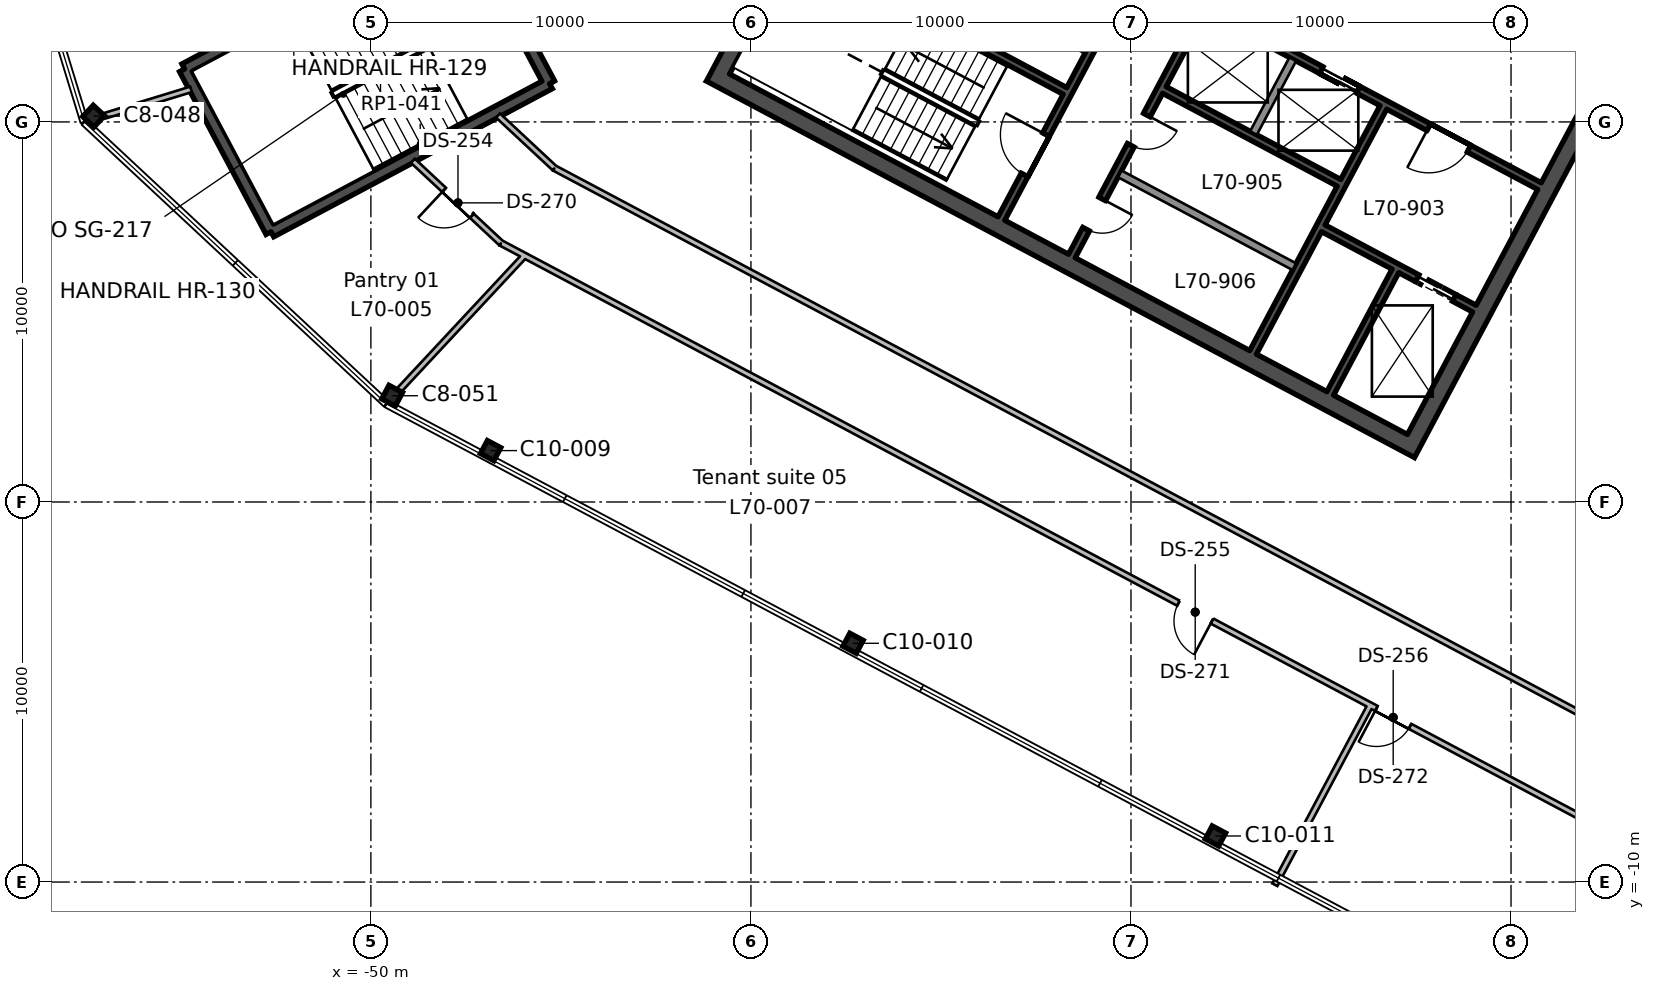
"""IFC4 building model, lengths in metres.
Left out: names, types, materials, properties, quantities, classifications, styles, units other than length and angle.
Written with IfcOpenShell. Run it as: python <this file> out.ifc"""

import sys

from ifc_helpers import new_model, si_unit, direction, frame, frame_2d, origin, origin_2d, place, context, subcontext, project, spatial, rectangle, i_section, extrude, element, fill, save


model = new_model("IFC4")
c1 = context("Model", 3, precision=1e-05, world=origin(), true_north=direction((0.0, 1.0)))
c2 = subcontext(c1, "Body", "Model", "MODEL_VIEW")
j1 = project(units=[si_unit("LENGTHUNIT", "METRE"), si_unit("PLANEANGLEUNIT", "RADIAN")], contexts=[c1])
p1 = place(None, origin())
s1 = spatial("IfcSite", under=j1, at=p1, CompositionType="ELEMENT")
p2 = place(p1, origin())
s2 = spatial("IfcBuilding", under=s1, at=p2, CompositionType="ELEMENT")
p3 = place(p2, frame((0.0, 0.0, 308.7)))
s3 = spatial("IfcBuildingStorey", under=s2, at=p3, CompositionType="ELEMENT", Elevation=308.7)
for number, where, z_axis, x_axis in (
    (1, (-27.777, -8.788, 0.0), (0.0, 0.0, 1.0), (0.883, -0.469, 0.0)),
    (2, (-37.313, -3.718, 0.0), (0.0, 0.0, 1.0), (0.883, -0.469, 0.0)),
    (3, (-46.849, 1.352, 0.0), (0.0, 0.0, 1.0), (0.883, -0.469, 0.0)),
):
    element("IfcColumn", number, at=place(p3, frame(where, z_axis=z_axis, x_axis=x_axis)), inside=s3, PredefinedType="COLUMN", context=c2, shape_type="SweptSolid", body=[
        extrude(i_section(OverallWidth=0.399, OverallDepth=0.386, WebThickness=0.021, FlangeThickness=0.033, FilletRadius=0.015, at=origin_2d()), origin(), (0.0, 0.0, 1.0), 3.9),
    ])
for number, where, z_axis, x_axis in (
    (4, (-49.441, 2.796, 0.0), (0.0, 0.0, 1.0), (0.883, -0.469, 0.0)),
    (5, (-57.296, 10.152, 0.0), (0.0, 0.0, 1.0), (0.731, -0.682, 0.0)),
):
    element("IfcColumn", number, at=place(p3, frame(where, z_axis=z_axis, x_axis=x_axis)), inside=s3, PredefinedType="COLUMN", context=c2, shape_type="SweptSolid", body=[
        extrude(i_section(OverallWidth=0.404, OverallDepth=0.406, WebThickness=0.027, FlangeThickness=0.044, FilletRadius=0.015, at=origin_2d()), origin(), (0.0, 0.0, 1.0), 3.9),
    ])
p4 = place(p3, frame((-13.771, 18.138, 0.0), z_axis=(0.0, 0.0, 1.0), x_axis=(-0.469467968382, -0.882949504028, 0.0)))
e6 = element("IfcWall", 6, at=p4, inside=s3, PredefinedType="SHEAR", context=c2, shape_type="SweptSolid", body=[
    extrude(rectangle(XDim=19.1, YDim=0.45, at=frame_2d((9.55, 0.0))), origin(), (0.0, 0.0, 1.0), 3.9),
])
p5 = place(p4, frame((6.55, 0.0, 0.0)))
e7 = element("IfcOpeningElement", 7, at=p5, cuts=e6, PredefinedType="OPENING", context=c2, shape_type="SweptSolid", body=[
    extrude(rectangle(XDim=2.4, YDim=2.4, at=frame_2d((1.2, 1.2))), frame((0.0, 0.235, 0.0), z_axis=(0.0, -1.0, 0.0), x_axis=(1.0, 0.0, 0.0)), (0.0, 0.0, 1.0), 0.47),
])
p6 = place(p3, frame((-32.004, 27.833, 0.0), z_axis=(0.0, 0.0, 1.0), x_axis=(-0.469467968382, -0.882949504028, 0.0)))
e8 = element("IfcWall", 8, at=p6, inside=s3, PredefinedType="SHEAR", context=c2, shape_type="SweptSolid", body=[
    extrude(rectangle(XDim=19.1, YDim=0.45, at=frame_2d((9.55, 0.0))), origin(), (0.0, 0.0, 1.0), 3.9),
])
p7 = place(p6, frame((10.15, 0.0, 0.0)))
e9 = element("IfcOpeningElement", 9, at=p7, cuts=e8, PredefinedType="OPENING", context=c2, shape_type="SweptSolid", body=[
    extrude(rectangle(XDim=2.4, YDim=2.4, at=frame_2d((1.2, 1.2))), frame((0.0, 0.235, 0.0), z_axis=(0.0, -1.0, 0.0), x_axis=(1.0, 0.0, 0.0)), (0.0, 0.0, 1.0), 0.47),
])
p8 = place(p3, frame((-22.832, 1.578, 0.0), z_axis=(0.0, 0.0, 1.0), x_axis=(-0.88294509198, 0.469476266226, 0.0)))
e10 = element("IfcWall", 10, at=p8, inside=s3, PredefinedType="SHEAR", context=c2, shape_type="SweptSolid", body=[
    extrude(rectangle(XDim=20.2, YDim=0.45, at=frame_2d((10.1, 0.0))), origin(), (0.0, 0.0, 1.0), 3.9),
])
p9 = place(p3, frame((-23.043, 6.08, 0.0), z_axis=(0.0, 0.0, 1.0), x_axis=(-0.469494272526, -0.882935517501, 0.0)))
e11 = element("IfcWall", 11, at=p9, inside=s3, PredefinedType="SHEAR", context=c2, shape_type="SweptSolid", body=[
    extrude(rectangle(XDim=3.65, YDim=0.2, at=frame_2d((1.825, 0.0))), origin(), (0.0, 0.0, 1.0), 3.9),
])
p10 = place(p3, frame((-23.36, 10.382, 0.0), z_axis=(0.0, 0.0, 1.0), x_axis=(-0.469480409012, -0.88294288918, 0.0)))
e12 = element("IfcWall", 12, at=p10, inside=s3, PredefinedType="SHEAR", context=c2, shape_type="SweptSolid", body=[
    extrude(rectangle(XDim=7.3, YDim=0.2, at=frame_2d((3.65, 0.0))), origin(), (0.0, 0.0, 1.0), 3.9),
])
p11 = place(p3, frame((-25.744, 11.65, 0.0), z_axis=(0.0, 0.0, 1.0), x_axis=(-0.469487830541, -0.882938942948, 0.0)))
e13 = element("IfcWall", 13, at=p11, inside=s3, PredefinedType="SOLIDWALL", context=c2, shape_type="SweptSolid", body=[
    extrude(rectangle(XDim=2.2, YDim=0.2, at=frame_2d((1.1, 0.0))), origin(), (0.0, 0.0, 1.0), 3.9),
])
p12 = place(p3, frame((-28.128, 12.917, 0.0), z_axis=(0.0, 0.0, 1.0), x_axis=(-0.469454336211, -0.882956752176, 0.0)))
e14 = element("IfcWall", 14, at=p12, inside=s3, PredefinedType="SHEAR", context=c2, shape_type="SweptSolid", body=[
    extrude(rectangle(XDim=7.3, YDim=0.2, at=frame_2d((3.65, 0.0))), origin(), (0.0, 0.0, 1.0), 3.9),
])
p13 = place(p12, frame((3.1, 0.0, 0.0)))
e15 = element("IfcOpeningElement", 15, at=p13, cuts=e14, PredefinedType="OPENING", context=c2, shape_type="SweptSolid", body=[
    extrude(rectangle(XDim=0.9, YDim=2.1, at=frame_2d((0.45, 1.05))), frame((0.0, 0.11, 0.0), z_axis=(0.0, -1.0, 0.0), x_axis=(1.0, 0.0, 0.0)), (0.0, 0.0, 1.0), 0.22),
])
p14 = place(p12, frame((5.6, 0.0, 0.0)))
e16 = element("IfcOpeningElement", 16, at=p14, cuts=e14, PredefinedType="OPENING", context=c2, shape_type="SweptSolid", body=[
    extrude(rectangle(XDim=0.9, YDim=2.1, at=frame_2d((0.45, 1.05))), frame((0.0, 0.11, 0.0), z_axis=(0.0, -1.0, 0.0), x_axis=(1.0, 0.0, 0.0)), (0.0, 0.0, 1.0), 0.22),
])
p15 = place(p3, frame((-29.982, 13.903, 0.0), z_axis=(0.0, 0.0, 1.0), x_axis=(-0.469454336211, -0.882956752176, 0.0)))
e17 = element("IfcWall", 17, at=p15, inside=s3, PredefinedType="SHEAR", context=c2, shape_type="SweptSolid", body=[
    extrude(rectangle(XDim=7.3, YDim=0.2, at=frame_2d((3.65, 0.0))), origin(), (0.0, 0.0, 1.0), 3.9),
])
p16 = place(p15, frame((4.8, 0.0, 0.0)))
e18 = element("IfcOpeningElement", 18, at=p16, cuts=e17, PredefinedType="OPENING", context=c2, shape_type="SweptSolid", body=[
    extrude(rectangle(XDim=1.2, YDim=2.1, at=frame_2d((0.6, 1.05))), frame((0.0, 0.11, 0.0), z_axis=(0.0, -1.0, 0.0), x_axis=(1.0, 0.0, 0.0)), (0.0, 0.0, 1.0), 0.22),
])
p17 = place(p3, frame((-19.252, 8.311, 0.0), z_axis=(0.0, 0.0, 1.0), x_axis=(-0.882955722218, 0.469456273365, 0.0)))
e19 = element("IfcWall", 19, at=p17, inside=s3, PredefinedType="SHEAR", context=c2, shape_type="SweptSolid", body=[
    extrude(rectangle(XDim=10.0, YDim=0.2, at=frame_2d((5.0, 0.0))), origin(), (0.0, 0.0, 1.0), 3.9),
])
p18 = place(p17, frame((2.1, 0.0, 0.0)))
e20 = element("IfcOpeningElement", 20, at=p18, cuts=e19, PredefinedType="OPENING", context=c2, shape_type="SweptSolid", body=[
    extrude(rectangle(XDim=1.2, YDim=2.1, at=frame_2d((0.6, 1.05))), frame((0.0, 0.11, 0.0), z_axis=(0.0, -1.0, 0.0), x_axis=(1.0, 0.0, 0.0)), (0.0, 0.0, 1.0), 0.22),
])
p19 = place(p17, frame((5.4, 0.0, 0.0)))
e21 = element("IfcOpeningElement", 21, at=p19, cuts=e19, PredefinedType="OPENING", context=c2, shape_type="SweptSolid", body=[
    extrude(rectangle(XDim=1.1, YDim=2.1, at=frame_2d((0.55, 1.05))), frame((0.0, 0.11, 0.0), z_axis=(0.0, -1.0, 0.0), x_axis=(1.0, 0.0, 0.0)), (0.0, 0.0, 1.0), 0.22),
])
p20 = place(p17, frame((8.1, 0.0, 0.0)))
e22 = element("IfcOpeningElement", 22, at=p20, cuts=e19, PredefinedType="OPENING", context=c2, shape_type="SweptSolid", body=[
    extrude(rectangle(XDim=1.1, YDim=2.1, at=frame_2d((0.55, 1.05))), frame((0.0, 0.11, 0.0), z_axis=(0.0, -1.0, 0.0), x_axis=(1.0, 0.0, 0.0)), (0.0, 0.0, 1.0), 0.22),
])
p21 = place(p3, frame((-24.528, 8.398, 0.0), z_axis=(0.0, 0.0, 1.0), x_axis=(-0.882953967957, 0.469459572775, 0.0)))
e23 = element("IfcWall", 23, at=p21, inside=s3, PredefinedType="SHEAR", context=c2, shape_type="SweptSolid", body=[
    extrude(rectangle(XDim=5.2, YDim=0.2, at=frame_2d((2.6, 0.0))), origin(), (0.0, 0.0, 1.0), 3.9),
])
p22 = place(p3, frame((-31.15, 11.919, 0.0), z_axis=(0.0, 0.0, 1.0), x_axis=(-0.882940221191, 0.469485426614, 0.0)))
e24 = element("IfcWall", 24, at=p22, inside=s3, PredefinedType="SHEAR", context=c2, shape_type="SweptSolid", body=[
    extrude(rectangle(XDim=8.0, YDim=0.2, at=frame_2d((4.0, 0.0))), origin(), (0.0, 0.0, 1.0), 3.9),
])
p23 = place(p3, frame((-20.965, 5.088, 0.0), z_axis=(0.0, 0.0, 1.0), x_axis=(-0.882925986334, 0.469512196493, 0.0)))
e25 = element("IfcWall", 25, at=p23, inside=s3, PredefinedType="SHEAR", context=c2, shape_type="SweptSolid", body=[
    extrude(rectangle(XDim=4.5, YDim=0.2, at=frame_2d((2.25, 0.0))), origin(), (0.0, 0.0, 1.0), 3.9),
])
p24 = place(p23, frame((0.6, 0.0, 0.0)))
e26 = element("IfcOpeningElement", 26, at=p24, cuts=e25, PredefinedType="OPENING", context=c2, shape_type="SweptSolid", body=[
    extrude(rectangle(XDim=1.1, YDim=2.1, at=frame_2d((0.55, 1.05))), frame((0.0, 0.11, 0.0), z_axis=(0.0, -1.0, 0.0), x_axis=(1.0, 0.0, 0.0)), (0.0, 0.0, 1.0), 0.22),
])
p25 = place(p3, frame((-31.737, 10.816, 0.0), z_axis=(0.0, 0.0, 1.0), x_axis=(-0.882940221191, 0.469485426614, 0.0)))
e27 = element("IfcWall", 27, at=p25, inside=s3, PredefinedType="SHEAR", context=c2, shape_type="SweptSolid", body=[
    extrude(rectangle(XDim=8.0, YDim=0.2, at=frame_2d((4.0, 0.0))), origin(), (0.0, 0.0, 1.0), 3.9),
])
p26 = place(p3, frame((-25.702, 6.191, 0.0), z_axis=(0.0, 0.0, 1.0), x_axis=(-0.882934506056, 0.469496174655, 0.0)))
e28 = element("IfcWall", 28, at=p26, inside=s3, PredefinedType="SOLIDWALL", context=c2, shape_type="SweptSolid", body=[
    extrude(rectangle(XDim=5.2, YDim=0.2, at=frame_2d((2.6, 0.0))), origin(), (0.0, 0.0, 1.0), 3.9),
])
p27 = place(p3, frame((-47.574, 15.29, 0.0), z_axis=(0.0, 0.0, 1.0), x_axis=(0.469443498566, -0.882962514297, 0.0)))
e29 = element("IfcWall", 29, at=p27, inside=s3, PredefinedType="SHEAR", context=c2, shape_type="SweptSolid", body=[
    extrude(rectangle(XDim=4.85, YDim=0.3, at=frame_2d((2.425, 0.0))), origin(), (0.0, 0.0, 1.0), 3.9),
])
p28 = place(p3, frame((-45.297, 11.007, 0.0), z_axis=(0.0, 0.0, 1.0), x_axis=(-0.882951519127, -0.469464178475, 0.0)))
e30 = element("IfcWall", 30, at=p28, inside=s3, PredefinedType="SHEAR", context=c2, shape_type="SweptSolid", body=[
    extrude(rectangle(XDim=8.3, YDim=0.3, at=frame_2d((4.15, 0.0))), origin(), (0.0, 0.0, 1.0), 3.9),
])
p29 = place(p3, frame((-52.626, 7.111, 0.0), z_axis=(0.0, 0.0, 1.0), x_axis=(-0.469464364128, 0.882951420416, 0.0)))
e31 = element("IfcWall", 31, at=p29, inside=s3, PredefinedType="SHEAR", context=c2, shape_type="SweptSolid", body=[
    extrude(rectangle(XDim=4.85, YDim=0.3, at=frame_2d((2.425, 0.0))), origin(), (0.0, 0.0, 1.0), 3.9),
])
p30 = place(p3, frame((-54.903, 11.393, 0.0), z_axis=(0.0, 0.0, 1.0), x_axis=(0.882939326045, 0.469487110071, 0.0)))
e32 = element("IfcWall", 32, at=p30, inside=s3, PredefinedType="SHEAR", context=c2, shape_type="SweptSolid", body=[
    extrude(rectangle(XDim=8.3, YDim=0.3, at=frame_2d((4.15, 0.0))), origin(), (0.0, 0.0, 1.0), 3.9),
])
p31 = place(p30, frame((6.05, 0.0, 0.0)))
e33 = element("IfcOpeningElement", 33, at=p31, cuts=e32, PredefinedType="OPENING", context=c2, shape_type="SweptSolid", body=[
    extrude(rectangle(XDim=1.9, YDim=2.1, at=frame_2d((0.95, 1.05))), frame((0.0, 0.16, 0.0), z_axis=(0.0, -1.0, 0.0), x_axis=(1.0, 0.0, 0.0)), (0.0, 0.0, 1.0), 0.32),
])
p32 = place(p3, frame((-54.732, 10.857, 0.0), z_axis=(0.0, 0.0, 1.0), x_axis=(-0.956231519395, -0.292611143525, 0.0)))
e34 = element("IfcWall", 34, at=p32, inside=s3, PredefinedType="PARTITIONING", context=c2, shape_type="SweptSolid", body=[
    extrude(rectangle(XDim=2.385, YDim=0.15, at=frame_2d((1.193, 0.0))), origin(), (0.0, 0.0, 1.0), 3.54),
])
p33 = place(p3, frame((-13.8, -7.895, 0.0), z_axis=(0.0, 0.0, 1.0), x_axis=(-0.882949728524, 0.469467546161, 0.0)))
e35 = element("IfcWall", 35, at=p33, inside=s3, PredefinedType="PARTITIONING", context=c2, shape_type="SweptSolid", body=[
    extrude(rectangle(XDim=35.527, YDim=0.15, at=frame_2d((17.764, 0.0))), origin(), (0.0, 0.0, 1.0), 3.54),
])
p34 = place(p3, frame((-45.169, 8.784, 0.0), z_axis=(0.0, 0.0, 1.0), x_axis=(-0.731546653506, 0.681791385795, 0.0)))
e36 = element("IfcWall", 36, at=p34, inside=s3, PredefinedType="PARTITIONING", context=c2, shape_type="SweptSolid", body=[
    extrude(rectangle(XDim=2.031, YDim=0.15, at=frame_2d((1.016, 0.0))), origin(), (0.0, 0.0, 1.0), 3.54),
])
p35 = place(p3, frame((-45.955, 6.484, 0.0), z_axis=(0.0, 0.0, 1.0), x_axis=(-0.681984927176, -0.731366227758, 0.0)))
e37 = element("IfcWall", 37, at=p35, inside=s3, PredefinedType="PARTITIONING", context=c2, shape_type="SweptSolid", body=[
    extrude(rectangle(XDim=4.855, YDim=0.15, at=frame_2d((2.427, 0.0))), origin(), (0.0, 0.0, 1.0), 3.54),
])
p36 = place(p3, frame((-23.702, -5.348, 0.0), z_axis=(0.0, 0.0, 1.0), x_axis=(-0.469522163358, -0.882920686198, 0.0)))
e38 = element("IfcWall", 38, at=p36, inside=s3, PredefinedType="PARTITIONING", context=c2, shape_type="SweptSolid", body=[
    extrude(rectangle(XDim=5.351, YDim=0.15, at=frame_2d((2.675, 0.0))), origin(), (0.0, 0.0, 1.0), 3.54),
])
p37 = place(p3, frame((-45.997, 6.506, 0.0), z_axis=(0.0, 0.0, 1.0), x_axis=(-0.883188174281, 0.469018814986, 0.0)))
e39 = element("IfcWall", 39, at=p37, inside=s3, PredefinedType="PARTITIONING", context=c2, shape_type="SweptSolid", body=[
    extrude(rectangle(XDim=0.654, YDim=0.15, at=frame_2d((0.327, 0.0))), origin(), (0.0, 0.0, 1.0), 3.54),
])
p38 = place(p3, frame((-46.575, 6.813, 0.0), z_axis=(0.0, 0.0, 1.0), x_axis=(-0.731111550609, 0.682257942839, 0.0)))
e40 = element("IfcWall", 40, at=p38, inside=s3, PredefinedType="PARTITIONING", context=c2, shape_type="SweptSolid", body=[
    extrude(rectangle(XDim=3.173, YDim=0.15, at=frame_2d((1.587, 0.0))), origin(), (0.0, 0.0, 1.0), 3.54),
])
p39 = place(p38, frame((1.05, 0.0, 0.0)))
e41 = element("IfcOpeningElement", 41, at=p39, cuts=e40, PredefinedType="OPENING", context=c2, shape_type="SweptSolid", body=[
    extrude(rectangle(XDim=1.0, YDim=2.1, at=frame_2d((0.5, 1.05))), frame((0.0, 0.085, 0.0), z_axis=(0.0, -1.0, 0.0), x_axis=(1.0, 0.0, 0.0)), (0.0, 0.0, 1.0), 0.17),
])
p40 = place(p3, frame((-10.695, -12.264, 0.0), z_axis=(0.0, 0.0, 1.0), x_axis=(-0.882951614076, 0.469463999899, 0.0)))
e42 = element("IfcWall", 42, at=p40, inside=s3, PredefinedType="PARTITIONING", context=c2, shape_type="SweptSolid", body=[
    extrude(rectangle(XDim=39.982, YDim=0.15, at=frame_2d((19.991, 0.0))), origin(), (0.0, 0.0, 1.0), 3.54),
])
p41 = place(p40, frame((19.45, 0.0, 0.0)))
e43 = element("IfcOpeningElement", 43, at=p41, cuts=e42, PredefinedType="OPENING", context=c2, shape_type="SweptSolid", body=[
    extrude(rectangle(XDim=1.0, YDim=2.1, at=frame_2d((0.5, 1.05))), frame((0.0, 0.085, 0.0), z_axis=(0.0, -1.0, 0.0), x_axis=(1.0, 0.0, 0.0)), (0.0, 0.0, 1.0), 0.17),
])
p42 = place(p40, frame((13.55, 0.0, 0.0)))
e44 = element("IfcOpeningElement", 44, at=p42, cuts=e42, PredefinedType="OPENING", context=c2, shape_type="SweptSolid", body=[
    extrude(rectangle(XDim=1.0, YDim=2.1, at=frame_2d((0.5, 1.05))), frame((0.0, 0.085, 0.0), z_axis=(0.0, -1.0, 0.0), x_axis=(1.0, 0.0, 0.0)), (0.0, 0.0, 1.0), 0.17),
])
p43 = place(p18, origin())
e45 = element("IfcDoor", 45, at=p43, inside=s3, OperationType="SINGLE_SWING_RIGHT", PredefinedType="DOOR", context=c2, shape_type="SweptSolid", body=[
    extrude(rectangle(XDim=1.2, YDim=2.1, at=frame_2d((0.6, 1.05))), frame((0.0, 0.025, 0.0), z_axis=(0.0, -1.0, 0.0), x_axis=(1.0, 0.0, 0.0)), (0.0, 0.0, 1.0), 0.05),
])
fill(e20, e45)
p44 = place(p16, frame((1.2, 0.0, 0.0), z_axis=(0.0, 0.0, 1.0), x_axis=(-1.0, 0.0, 0.0)))
e46 = element("IfcDoor", 46, at=p44, inside=s3, OperationType="SINGLE_SWING_RIGHT", PredefinedType="DOOR", context=c2, shape_type="SweptSolid", body=[
    extrude(rectangle(XDim=1.2, YDim=2.1, at=frame_2d((0.6, 1.05))), frame((0.0, 0.025, 0.0), z_axis=(0.0, -1.0, 0.0), x_axis=(1.0, 0.0, 0.0)), (0.0, 0.0, 1.0), 0.05),
])
fill(e18, e46)
p45 = place(p19, origin())
e47 = element("IfcDoor", 47, at=p45, inside=s3, OperationType="DOUBLE_DOOR_SLIDING", PredefinedType="DOOR", context=c2, shape_type="SweptSolid", body=[
    extrude(rectangle(XDim=1.1, YDim=2.1, at=frame_2d((0.55, 1.05))), frame((0.0, 0.025, 0.0), z_axis=(0.0, -1.0, 0.0), x_axis=(1.0, 0.0, 0.0)), (0.0, 0.0, 1.0), 0.05),
])
fill(e21, e47)
p46 = place(p24, origin())
e48 = element("IfcDoor", 48, at=p46, inside=s3, OperationType="DOUBLE_DOOR_SLIDING", PredefinedType="DOOR", context=c2, shape_type="SweptSolid", body=[
    extrude(rectangle(XDim=1.1, YDim=2.1, at=frame_2d((0.55, 1.05))), frame((0.0, 0.025, 0.0), z_axis=(0.0, -1.0, 0.0), x_axis=(1.0, 0.0, 0.0)), (0.0, 0.0, 1.0), 0.05),
])
fill(e26, e48)
p47 = place(p13, origin())
e49 = element("IfcDoor", 49, at=p47, inside=s3, OperationType="SINGLE_SWING_LEFT", PredefinedType="DOOR", context=c2, shape_type="SweptSolid", body=[
    extrude(rectangle(XDim=0.9, YDim=2.1, at=frame_2d((0.45, 1.05))), frame((0.0, 0.025, 0.0), z_axis=(0.0, -1.0, 0.0), x_axis=(1.0, 0.0, 0.0)), (0.0, 0.0, 1.0), 0.05),
])
fill(e15, e49)
p48 = place(p14, origin())
e50 = element("IfcDoor", 50, at=p48, inside=s3, OperationType="SINGLE_SWING_LEFT", PredefinedType="DOOR", context=c2, shape_type="SweptSolid", body=[
    extrude(rectangle(XDim=0.9, YDim=2.1, at=frame_2d((0.45, 1.05))), frame((0.0, 0.025, 0.0), z_axis=(0.0, -1.0, 0.0), x_axis=(1.0, 0.0, 0.0)), (0.0, 0.0, 1.0), 0.05),
])
fill(e16, e50)
p49 = place(p39, origin())
e51 = element("IfcDoor", 51, at=p49, inside=s3, OperationType="SINGLE_SWING_RIGHT", PredefinedType="DOOR", context=c2, shape_type="SweptSolid", body=[
    extrude(rectangle(XDim=1.0, YDim=2.1, at=frame_2d((0.5, 1.05))), frame((0.0, 0.025, 0.0), z_axis=(0.0, -1.0, 0.0), x_axis=(1.0, 0.0, 0.0)), (0.0, 0.0, 1.0), 0.05),
])
fill(e41, e51)
p50 = place(p41, origin())
e52 = element("IfcDoor", 52, at=p50, inside=s3, OperationType="SINGLE_SWING_LEFT", PredefinedType="DOOR", context=c2, shape_type="SweptSolid", body=[
    extrude(rectangle(XDim=1.0, YDim=2.1, at=frame_2d((0.5, 1.05))), frame((0.0, 0.025, 0.0), z_axis=(0.0, -1.0, 0.0), x_axis=(1.0, 0.0, 0.0)), (0.0, 0.0, 1.0), 0.05),
])
fill(e43, e52)
p51 = place(p42, origin())
e53 = element("IfcDoor", 53, at=p51, inside=s3, OperationType="SINGLE_SWING_RIGHT", PredefinedType="DOOR", context=c2, shape_type="SweptSolid", body=[
    extrude(rectangle(XDim=1.0, YDim=2.1, at=frame_2d((0.5, 1.05))), frame((0.0, 0.025, 0.0), z_axis=(0.0, -1.0, 0.0), x_axis=(1.0, 0.0, 0.0)), (0.0, 0.0, 1.0), 0.05),
])
fill(e44, e53)
save(model, sys.argv[1])
